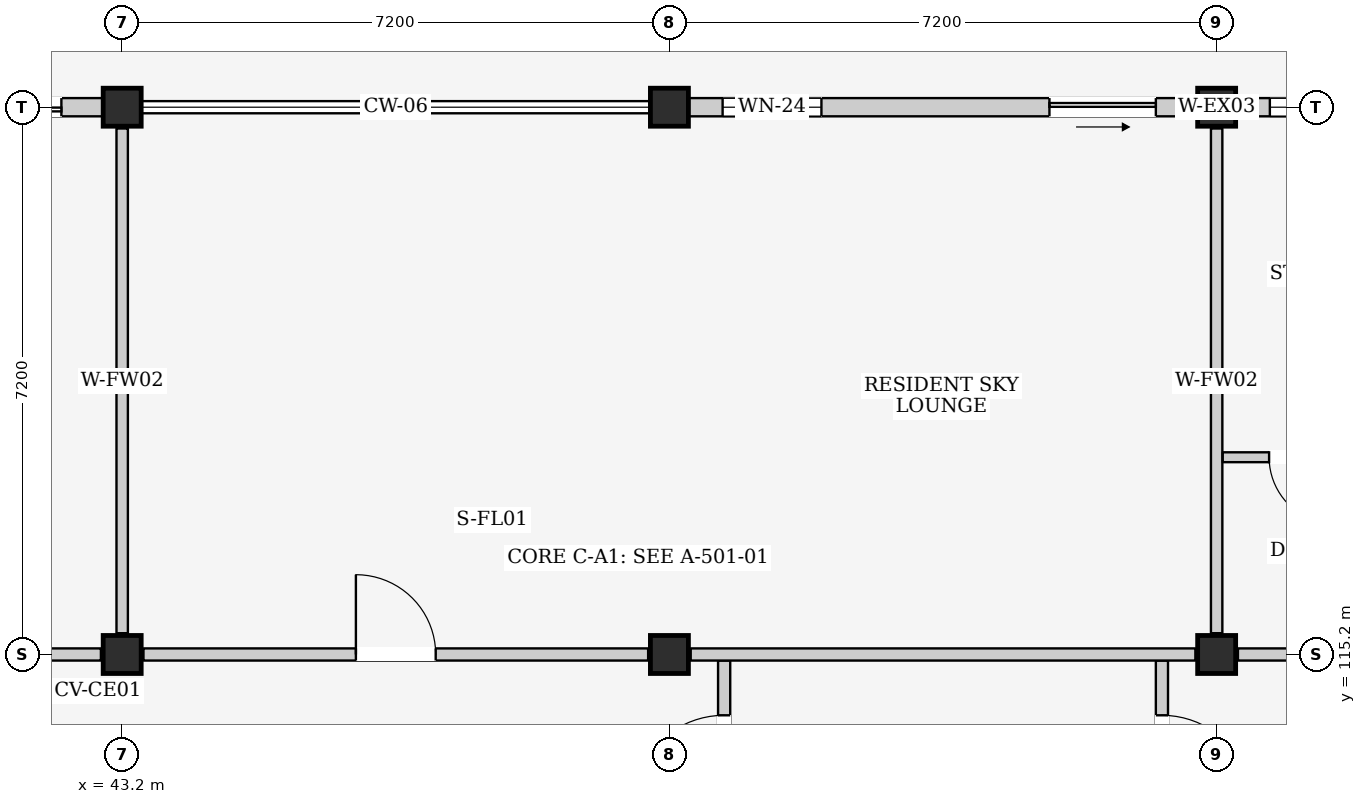
"""IFC4 building model, lengths in metres.
Left out: names, types, materials, properties, quantities, classifications, styles, units other than length and angle.
Written with IfcOpenShell. Run it as: python <this file> out.ifc"""

import sys

from ifc_helpers import new_model, si_unit, direction, frame, frame_2d, origin, origin_2d, place, context, subcontext, project, spatial, rectangle, extrude, element, fill, save


model = new_model("IFC4")
c1 = context("Model", 3, precision=1e-05, world=origin(), true_north=direction((0.0, 1.0)))
c2 = subcontext(c1, "Body", "Model", "MODEL_VIEW")
j1 = project(units=[si_unit("LENGTHUNIT", "METRE"), si_unit("PLANEANGLEUNIT", "RADIAN")], contexts=[c1])
p1 = place(None, origin())
s1 = spatial("IfcSite", under=j1, at=p1, CompositionType="ELEMENT")
p2 = place(p1, origin())
s2 = spatial("IfcBuilding", under=s1, at=p2, CompositionType="ELEMENT")
p3 = place(p2, frame((0.0, 0.0, 44.4)))
s3 = spatial("IfcBuildingStorey", under=s2, at=p3, CompositionType="ELEMENT", Elevation=44.4)
for number, where, z_axis, x_axis in (
    (1, (43.2, 115.2, 0.0), (0.0, 0.0, 1.0), (1.0, 0.0, 0.0)),
    (2, (43.2, 122.4, 0.0), (0.0, 0.0, 1.0), (1.0, 0.0, 0.0)),
    (3, (50.4, 115.2, 0.0), (0.0, 0.0, 1.0), (1.0, 0.0, 0.0)),
    (4, (50.4, 122.4, 0.0), (0.0, 0.0, 1.0), (1.0, 0.0, 0.0)),
    (5, (57.6, 115.2, 0.0), (0.0, 0.0, 1.0), (1.0, 0.0, 0.0)),
    (6, (57.6, 122.4, 0.0), (0.0, 0.0, 1.0), (1.0, 0.0, 0.0)),
):
    element("IfcColumn", number, at=place(p3, frame(where, z_axis=z_axis, x_axis=x_axis)), inside=s3, PredefinedType="COLUMN", context=c2, shape_type="SweptSolid", body=[
        extrude(rectangle(XDim=0.5, YDim=0.5, at=origin_2d()), origin(), (0.0, 0.0, 1.0), 3.3),
    ])
p4 = place(p3, frame((36.25, 122.4, 0.0), z_axis=(0.0, 0.0, 1.0), x_axis=(1.0, 0.0, 0.0)))
e7 = element("IfcWall", 7, at=p4, inside=s3, PredefinedType="ELEMENTEDWALL", context=c2, shape_type="SweptSolid", body=[
    extrude(rectangle(XDim=6.7, YDim=0.24, at=frame_2d((3.35, 0.0))), origin(), (0.0, 0.0, 1.0), 2.615),
])
p5 = place(p4, frame((3.75, 0.0, 0.0)))
e8 = element("IfcOpeningElement", 8, at=p5, cuts=e7, PredefinedType="OPENING", context=c2, shape_type="SweptSolid", body=[
    extrude(rectangle(XDim=2.4, YDim=2.12, at=frame_2d((1.2, 1.06))), frame((0.0, 0.135, 0.0), z_axis=(0.0, -1.0, 0.0), x_axis=(1.0, 0.0, 0.0)), (0.0, 0.0, 1.0), 0.27),
])
p6 = place(p4, frame((0.45, 0.0, 0.9)))
e9 = element("IfcOpeningElement", 9, at=p6, cuts=e7, PredefinedType="OPENING", context=c2, shape_type="SweptSolid", body=[
    extrude(rectangle(XDim=1.55, YDim=1.45, at=frame_2d((0.775, 0.725))), frame((0.0, 0.135, 0.0), z_axis=(0.0, -1.0, 0.0), x_axis=(1.0, 0.0, 0.0)), (0.0, 0.0, 1.0), 0.27),
])
p7 = place(p3, frame((50.65, 122.4, 0.0), z_axis=(0.0, 0.0, 1.0), x_axis=(1.0, 0.0, 0.0)))
e10 = element("IfcWall", 10, at=p7, inside=s3, PredefinedType="ELEMENTEDWALL", context=c2, shape_type="SweptSolid", body=[
    extrude(rectangle(XDim=6.7, YDim=0.24, at=frame_2d((3.35, 0.0))), origin(), (0.0, 0.0, 1.0), 2.615),
])
p8 = place(p7, frame((4.75, 0.0, 0.0)))
e11 = element("IfcOpeningElement", 11, at=p8, cuts=e10, PredefinedType="OPENING", context=c2, shape_type="SweptSolid", body=[
    extrude(rectangle(XDim=1.4, YDim=2.1, at=frame_2d((0.7, 1.05))), frame((0.0, 0.135, 0.0), z_axis=(0.0, -1.0, 0.0), x_axis=(1.0, 0.0, 0.0)), (0.0, 0.0, 1.0), 0.27),
])
p9 = place(p7, frame((0.45, 0.0, 0.9)))
e12 = element("IfcOpeningElement", 12, at=p9, cuts=e10, PredefinedType="OPENING", context=c2, shape_type="SweptSolid", body=[
    extrude(rectangle(XDim=1.3, YDim=1.25, at=frame_2d((0.65, 0.625))), frame((0.0, 0.135, 0.0), z_axis=(0.0, -1.0, 0.0), x_axis=(1.0, 0.0, 0.0)), (0.0, 0.0, 1.0), 0.27),
])
p10 = place(p3, frame((57.85, 122.4, 0.0), z_axis=(0.0, 0.0, 1.0), x_axis=(1.0, 0.0, 0.0)))
e13 = element("IfcWall", 13, at=p10, inside=s3, PredefinedType="ELEMENTEDWALL", context=c2, shape_type="SweptSolid", body=[
    extrude(rectangle(XDim=6.7, YDim=0.24, at=frame_2d((3.35, 0.0))), origin(), (0.0, 0.0, 1.0), 2.615),
])
p11 = place(p10, frame((4.35, 0.0, 0.0)))
e14 = element("IfcOpeningElement", 14, at=p11, cuts=e13, PredefinedType="OPENING", context=c2, shape_type="SweptSolid", body=[
    extrude(rectangle(XDim=1.8, YDim=2.12, at=frame_2d((0.9, 1.06))), frame((0.0, 0.135, 0.0), z_axis=(0.0, -1.0, 0.0), x_axis=(1.0, 0.0, 0.0)), (0.0, 0.0, 1.0), 0.27),
])
p12 = place(p10, frame((0.45, 0.0, 0.9)))
e15 = element("IfcOpeningElement", 15, at=p12, cuts=e13, PredefinedType="OPENING", context=c2, shape_type="SweptSolid", body=[
    extrude(rectangle(XDim=2.05, YDim=1.6, at=frame_2d((1.025, 0.8))), frame((0.0, 0.135, 0.0), z_axis=(0.0, -1.0, 0.0), x_axis=(1.0, 0.0, 0.0)), (0.0, 0.0, 1.0), 0.27),
])
p13 = place(p3, frame((51.12, 111.1, 0.0), z_axis=(0.0, 0.0, 1.0), x_axis=(0.0, 1.0, 0.0)))
e16 = element("IfcWall", 16, at=p13, inside=s3, PredefinedType="PARTITIONING", context=c2, shape_type="SweptSolid", body=[
    extrude(rectangle(XDim=4.02, YDim=0.16, at=frame_2d((2.01, 0.0))), origin(), (0.0, 0.0, 1.0), 3.08),
])
p14 = place(p13, frame((2.1, 0.0, 0.0)))
e17 = element("IfcOpeningElement", 17, at=p14, cuts=e16, PredefinedType="OPENING", context=c2, shape_type="SweptSolid", body=[
    extrude(rectangle(XDim=1.2, YDim=2.2, at=frame_2d((0.6, 1.1))), frame((0.0, 0.095, 0.0), z_axis=(0.0, -1.0, 0.0), x_axis=(1.0, 0.0, 0.0)), (0.0, 0.0, 1.0), 0.19),
])
p15 = place(p3, frame((56.88, 111.1, 0.0), z_axis=(0.0, 0.0, 1.0), x_axis=(0.0, 1.0, 0.0)))
e18 = element("IfcWall", 18, at=p15, inside=s3, PredefinedType="PARTITIONING", context=c2, shape_type="SweptSolid", body=[
    extrude(rectangle(XDim=4.02, YDim=0.16, at=frame_2d((2.01, 0.0))), origin(), (0.0, 0.0, 1.0), 3.08),
])
p16 = place(p15, frame((2.1, 0.0, 0.0)))
e19 = element("IfcOpeningElement", 19, at=p16, cuts=e18, PredefinedType="OPENING", context=c2, shape_type="SweptSolid", body=[
    extrude(rectangle(XDim=1.2, YDim=2.2, at=frame_2d((0.6, 1.1))), frame((0.0, 0.095, 0.0), z_axis=(0.0, -1.0, 0.0), x_axis=(1.0, 0.0, 0.0)), (0.0, 0.0, 1.0), 0.19),
])
p17 = place(p3, frame((36.28, 115.2, 0.0), z_axis=(0.0, 0.0, 1.0), x_axis=(1.0, 0.0, 0.0)))
e20 = element("IfcWall", 20, at=p17, inside=s3, PredefinedType="PARTITIONING", context=c2, shape_type="SweptSolid", body=[
    extrude(rectangle(XDim=6.64, YDim=0.16, at=frame_2d((3.32, 0.0))), origin(), (0.0, 0.0, 1.0), 2.415),
])
p18 = place(p17, frame((2.82, 0.0, 0.0)))
e21 = element("IfcOpeningElement", 21, at=p18, cuts=e20, PredefinedType="OPENING", context=c2, shape_type="SweptSolid", body=[
    extrude(rectangle(XDim=1.0, YDim=2.15, at=frame_2d((0.5, 1.075))), frame((0.0, 0.095, 0.0), z_axis=(0.0, -1.0, 0.0), x_axis=(1.0, 0.0, 0.0)), (0.0, 0.0, 1.0), 0.19),
])
p19 = place(p3, frame((43.2, 115.48, 0.0), z_axis=(0.0, 0.0, 1.0), x_axis=(0.0, 1.0, 0.0)))
e22 = element("IfcWall", 22, at=p19, inside=s3, PredefinedType="PARTITIONING", context=c2, shape_type="SweptSolid", body=[
    extrude(rectangle(XDim=6.64, YDim=0.15, at=frame_2d((3.32, 0.0))), origin(), (0.0, 0.0, 1.0), 2.565),
])
p20 = place(p3, frame((43.48, 115.2, 0.0), z_axis=(0.0, 0.0, 1.0), x_axis=(1.0, 0.0, 0.0)))
e23 = element("IfcWall", 23, at=p20, inside=s3, PredefinedType="PARTITIONING", context=c2, shape_type="SweptSolid", body=[
    extrude(rectangle(XDim=6.64, YDim=0.16, at=frame_2d((3.32, 0.0))), origin(), (0.0, 0.0, 1.0), 2.415),
])
p21 = place(p20, frame((2.795, 0.0, 0.0)))
e24 = element("IfcOpeningElement", 24, at=p21, cuts=e23, PredefinedType="OPENING", context=c2, shape_type="SweptSolid", body=[
    extrude(rectangle(XDim=1.05, YDim=2.2, at=frame_2d((0.525, 1.1))), frame((0.0, 0.095, 0.0), z_axis=(0.0, -1.0, 0.0), x_axis=(1.0, 0.0, 0.0)), (0.0, 0.0, 1.0), 0.19),
])
p22 = place(p3, frame((50.68, 115.2, 0.0), z_axis=(0.0, 0.0, 1.0), x_axis=(1.0, 0.0, 0.0)))
e25 = element("IfcWall", 25, at=p22, inside=s3, PredefinedType="PARTITIONING", context=c2, shape_type="SweptSolid", body=[
    extrude(rectangle(XDim=6.64, YDim=0.16, at=frame_2d((3.32, 0.0))), origin(), (0.0, 0.0, 1.0), 2.415),
])
p23 = place(p3, frame((57.6, 115.48, 0.0), z_axis=(0.0, 0.0, 1.0), x_axis=(0.0, 1.0, 0.0)))
e26 = element("IfcWall", 26, at=p23, inside=s3, PredefinedType="PARTITIONING", context=c2, shape_type="SweptSolid", body=[
    extrude(rectangle(XDim=6.64, YDim=0.15, at=frame_2d((3.32, 0.0))), origin(), (0.0, 0.0, 1.0), 2.565),
])
p24 = place(p3, frame((57.88, 115.2, 0.0), z_axis=(0.0, 0.0, 1.0), x_axis=(1.0, 0.0, 0.0)))
e27 = element("IfcWall", 27, at=p24, inside=s3, PredefinedType="PARTITIONING", context=c2, shape_type="SweptSolid", body=[
    extrude(rectangle(XDim=6.64, YDim=0.16, at=frame_2d((3.32, 0.0))), origin(), (0.0, 0.0, 1.0), 2.415),
])
p25 = place(p24, frame((2.82, 0.0, 0.0)))
e28 = element("IfcOpeningElement", 28, at=p25, cuts=e27, PredefinedType="OPENING", context=c2, shape_type="SweptSolid", body=[
    extrude(rectangle(XDim=1.0, YDim=2.15, at=frame_2d((0.5, 1.075))), frame((0.0, 0.095, 0.0), z_axis=(0.0, -1.0, 0.0), x_axis=(1.0, 0.0, 0.0)), (0.0, 0.0, 1.0), 0.19),
])
p26 = place(p3, frame((57.68, 117.795, 0.0), z_axis=(0.0, 0.0, 1.0), x_axis=(1.0, 0.0, 0.0)))
e29 = element("IfcWall", 29, at=p26, inside=s3, PredefinedType="PARTITIONING", context=c2, shape_type="SweptSolid", body=[
    extrude(rectangle(XDim=2.1, YDim=0.13, at=frame_2d((1.05, 0.0))), origin(), (0.0, 0.0, 1.0), 3.08),
])
p27 = place(p26, frame((0.61, 0.0, 0.0)))
e30 = element("IfcOpeningElement", 30, at=p27, cuts=e29, PredefinedType="OPENING", context=c2, shape_type="SweptSolid", body=[
    extrude(rectangle(XDim=0.88, YDim=2.1, at=frame_2d((0.44, 1.05))), frame((0.0, 0.08, 0.0), z_axis=(0.0, -1.0, 0.0), x_axis=(1.0, 0.0, 0.0)), (0.0, 0.0, 1.0), 0.16),
])
p28 = place(p5, frame((2.4, 0.0, 0.0), z_axis=(0.0, 0.0, 1.0), x_axis=(-1.0, 0.0, 0.0)))
e31 = element("IfcDoor", 31, at=p28, inside=s3, OperationType="DOUBLE_DOOR_SLIDING", PredefinedType="DOOR", context=c2, shape_type="SweptSolid", body=[
    extrude(rectangle(XDim=2.4, YDim=2.12, at=frame_2d((1.2, 1.06))), frame((0.0, 0.025, 0.0), z_axis=(0.0, -1.0, 0.0), x_axis=(1.0, 0.0, 0.0)), (0.0, 0.0, 1.0), 0.05),
])
fill(e8, e31)
p29 = place(p8, frame((1.4, 0.0, 0.0), z_axis=(0.0, 0.0, 1.0), x_axis=(-1.0, 0.0, 0.0)))
e32 = element("IfcDoor", 32, at=p29, inside=s3, OperationType="SLIDING_TO_RIGHT", PredefinedType="DOOR", context=c2, shape_type="SweptSolid", body=[
    extrude(rectangle(XDim=1.4, YDim=2.1, at=frame_2d((0.7, 1.05))), frame((0.0, 0.025, 0.0), z_axis=(0.0, -1.0, 0.0), x_axis=(1.0, 0.0, 0.0)), (0.0, 0.0, 1.0), 0.05),
])
fill(e11, e32)
p30 = place(p9, origin())
e33 = element("IfcWindow", 33, at=p30, inside=s3, PartitioningType="SINGLE_PANEL", PredefinedType="WINDOW", context=c2, shape_type="SweptSolid", body=[
    extrude(rectangle(XDim=1.3, YDim=1.25, at=frame_2d((0.65, 0.625))), frame((0.0, 0.03, 0.0), z_axis=(0.0, -1.0, 0.0), x_axis=(1.0, 0.0, 0.0)), (0.0, 0.0, 1.0), 0.06),
])
fill(e12, e33)
p31 = place(p12, origin())
e34 = element("IfcWindow", 34, at=p31, inside=s3, PartitioningType="DOUBLE_PANEL_VERTICAL", PredefinedType="WINDOW", context=c2, shape_type="SweptSolid", body=[
    extrude(rectangle(XDim=2.05, YDim=1.6, at=frame_2d((1.025, 0.8))), frame((0.0, 0.03, 0.0), z_axis=(0.0, -1.0, 0.0), x_axis=(1.0, 0.0, 0.0)), (0.0, 0.0, 1.0), 0.06),
])
fill(e15, e34)
p32 = place(p14, origin())
e35 = element("IfcDoor", 35, at=p32, inside=s3, OperationType="SINGLE_SWING_LEFT", PredefinedType="DOOR", context=c2, shape_type="SweptSolid", body=[
    extrude(rectangle(XDim=1.2, YDim=2.2, at=frame_2d((0.6, 1.1))), frame((0.0, 0.025, 0.0), z_axis=(0.0, -1.0, 0.0), x_axis=(1.0, 0.0, 0.0)), (0.0, 0.0, 1.0), 0.05),
])
fill(e17, e35)
p33 = place(p16, frame((1.2, 0.0, 0.0), z_axis=(0.0, 0.0, 1.0), x_axis=(-1.0, 0.0, 0.0)))
e36 = element("IfcDoor", 36, at=p33, inside=s3, OperationType="SINGLE_SWING_RIGHT", PredefinedType="DOOR", context=c2, shape_type="SweptSolid", body=[
    extrude(rectangle(XDim=1.2, YDim=2.2, at=frame_2d((0.6, 1.1))), frame((0.0, 0.025, 0.0), z_axis=(0.0, -1.0, 0.0), x_axis=(1.0, 0.0, 0.0)), (0.0, 0.0, 1.0), 0.05),
])
fill(e19, e36)
p34 = place(p21, origin())
e37 = element("IfcDoor", 37, at=p34, inside=s3, OperationType="SINGLE_SWING_LEFT", PredefinedType="DOOR", context=c2, shape_type="SweptSolid", body=[
    extrude(rectangle(XDim=1.05, YDim=2.2, at=frame_2d((0.525, 1.1))), frame((0.0, 0.025, 0.0), z_axis=(0.0, -1.0, 0.0), x_axis=(1.0, 0.0, 0.0)), (0.0, 0.0, 1.0), 0.05),
])
fill(e24, e37)
p35 = place(p27, frame((0.88, 0.0, 0.0), z_axis=(0.0, 0.0, 1.0), x_axis=(-1.0, 0.0, 0.0)))
e38 = element("IfcDoor", 38, at=p35, inside=s3, OperationType="SINGLE_SWING_LEFT", PredefinedType="DOOR", context=c2, shape_type="SweptSolid", body=[
    extrude(rectangle(XDim=0.88, YDim=2.1, at=frame_2d((0.44, 1.05))), frame((0.0, 0.025, 0.0), z_axis=(0.0, -1.0, 0.0), x_axis=(1.0, 0.0, 0.0)), (0.0, 0.0, 1.0), 0.05),
])
fill(e30, e38)
save(model, sys.argv[1])
